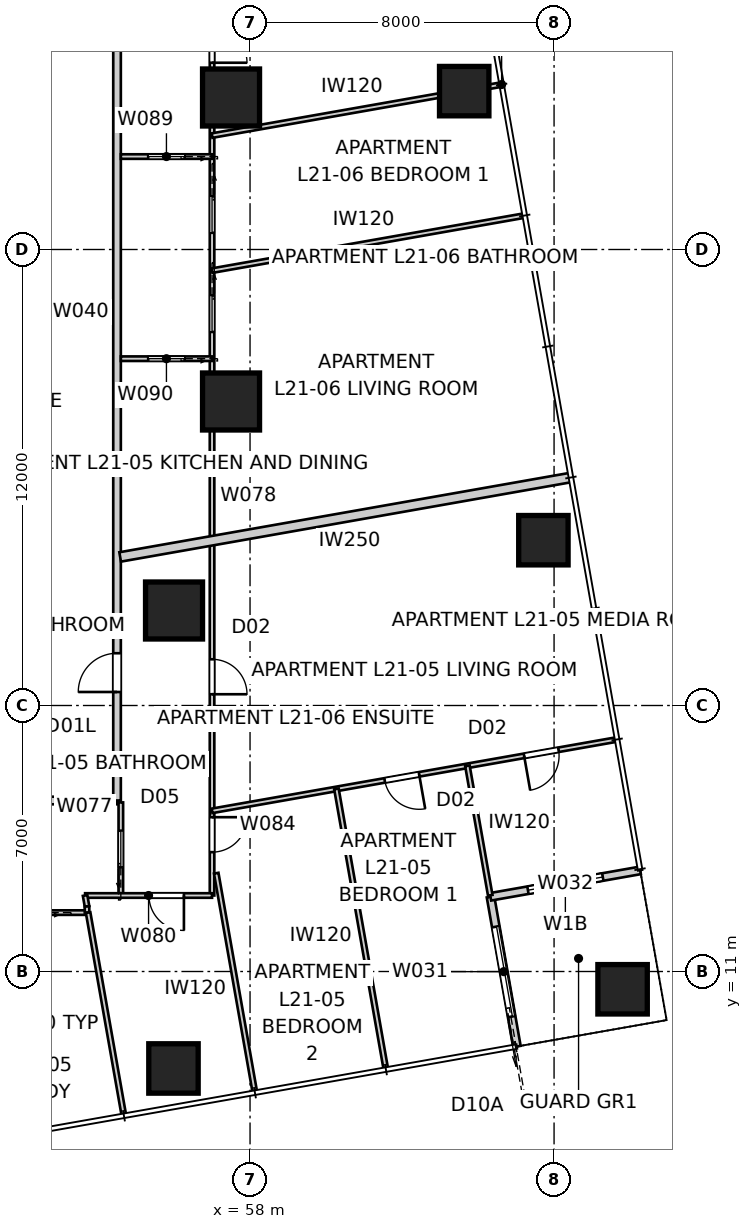
"""IFC4 building model, lengths in metres.
Left out: names, types, materials, properties, quantities, classifications, styles, units other than length and angle.
Written with IfcOpenShell. Run it as: python <this file> out.ifc"""

import sys

from ifc_helpers import new_model, si_unit, direction, frame, frame_2d, origin, origin_2d, place, context, subcontext, project, spatial, rectangle, extrude, element, fill, save


model = new_model("IFC4")
c1 = context("Model", 3, precision=1e-05, world=origin(), true_north=direction((0.0, 1.0)))
c2 = subcontext(c1, "Body", "Model", "MODEL_VIEW")
j1 = project(units=[si_unit("LENGTHUNIT", "METRE"), si_unit("PLANEANGLEUNIT", "RADIAN")], contexts=[c1])
p1 = place(None, origin())
s1 = spatial("IfcSite", under=j1, at=p1, CompositionType="ELEMENT")
p2 = place(p1, origin())
s2 = spatial("IfcBuilding", under=s1, at=p2, CompositionType="ELEMENT")
p3 = place(p2, frame((0.0, 0.0, 79.4)))
s3 = spatial("IfcBuildingStorey", under=s2, at=p3, CompositionType="ELEMENT", Elevation=79.4)
for number, where, z_axis, x_axis in (
    (1, (55.985, 8.448, -0.15), (0.0, 0.0, 1.0), (1.0, 0.0, 0.0)),
    (2, (67.803, 10.532, -0.15), (0.0, 0.0, 1.0), (1.0, 0.0, 0.0)),
    (3, (65.719, 22.35, -0.15), (0.0, 0.0, 1.0), (1.0, 0.0, 0.0)),
    (4, (63.635, 34.167, -0.15), (0.0, 0.0, 1.0), (1.0, 0.0, 0.0)),
):
    element("IfcColumn", number, at=place(p3, frame(where, z_axis=z_axis, x_axis=x_axis)), inside=s3, PredefinedType="COLUMN", context=c2, shape_type="SweptSolid", body=[
        extrude(rectangle(XDim=1.3, YDim=1.3, at=origin_2d()), origin(), (0.0, 0.0, 1.0), 3.55),
    ])
for number, where, z_axis, x_axis in (
    (5, (57.5, 26.0, 0.0), (0.0, 0.0, 1.0), (1.0, 0.0, 0.0)),
    (6, (57.5, 34.0, 0.0), (0.0, 0.0, 1.0), (1.0, 0.0, 0.0)),
    (7, (56.0, 20.5, 0.0), (0.0, 0.0, 1.0), (1.0, 0.0, 0.0)),
):
    element("IfcColumn", number, at=place(p3, frame(where, z_axis=z_axis, x_axis=x_axis)), inside=s3, PredefinedType="COLUMN", context=c2, shape_type="SweptSolid", body=[
        extrude(rectangle(XDim=1.5, YDim=1.5, at=origin_2d()), origin(), (0.0, 0.0, 1.0), 3.4),
    ])
p4 = place(p3, frame((65.022, 9.026, 0.0), z_axis=(0.0, 0.0, 1.0), x_axis=(-0.173646056486, 0.984808127031, 0.0)))
e8 = element("IfcWall", 8, at=p4, inside=s3, PredefinedType="SOLIDWALL", context=c2, shape_type="SweptSolid", body=[
    extrude(rectangle(XDim=4.0, YDim=0.2, at=frame_2d((2.0, 0.0))), origin(), (0.0, 0.0, 1.0), 3.25),
])
p5 = place(p4, frame((0.8, 0.0, 0.0)))
e9 = element("IfcOpeningElement", 9, at=p5, cuts=e8, PredefinedType="OPENING", context=c2, shape_type="SweptSolid", body=[
    extrude(rectangle(XDim=2.4, YDim=2.1, at=frame_2d((1.2, 1.05))), frame((0.0, 0.11, 0.0), z_axis=(0.0, -1.0, 0.0), x_axis=(1.0, 0.0, 0.0)), (0.0, 0.0, 1.0), 0.22),
])
p6 = place(p3, frame((64.328, 12.966, 0.0), z_axis=(0.0, 0.0, 1.0), x_axis=(0.984808127031, 0.173646056486, 0.0)))
e10 = element("IfcWall", 10, at=p6, inside=s3, PredefinedType="SOLIDWALL", context=c2, shape_type="SweptSolid", body=[
    extrude(rectangle(XDim=4.0, YDim=0.2, at=frame_2d((2.0, 0.0))), origin(), (0.0, 0.0, 1.0), 3.25),
])
p7 = place(p6, frame((1.0, 0.0, 0.45)))
e11 = element("IfcOpeningElement", 11, at=p7, cuts=e10, PredefinedType="OPENING", context=c2, shape_type="SweptSolid", body=[
    extrude(rectangle(XDim=2.0, YDim=1.8, at=frame_2d((1.0, 0.9))), frame((0.0, 0.11, 0.0), z_axis=(0.0, -1.0, 0.0), x_axis=(1.0, 0.0, 0.0)), (0.0, 0.0, 1.0), 0.22),
])
p8 = place(p3, frame((25.5, 15.5, 0.0), z_axis=(0.0, 0.0, 1.0), x_axis=(1.0, 0.0, 0.0)))
e12 = element("IfcWall", 12, at=p8, inside=s3, PredefinedType="PARTITIONING", context=c2, shape_type="SweptSolid", body=[
    extrude(rectangle(XDim=29.0, YDim=0.2, at=frame_2d((14.5, 0.0))), origin(), (0.0, 0.0, 1.0), 3.25),
])
p9 = place(p8, frame((15.794, 0.0, 0.0)))
e13 = element("IfcOpeningElement", 13, at=p9, cuts=e12, PredefinedType="OPENING", context=c2, shape_type="SweptSolid", body=[
    extrude(rectangle(XDim=1.02, YDim=2.34, at=frame_2d((0.51, 1.17))), frame((0.0, 0.11, 0.0), z_axis=(0.0, -1.0, 0.0), x_axis=(1.0, 0.0, 0.0)), (0.0, 0.0, 1.0), 0.22),
])
p10 = place(p8, frame((6.067, 0.0, 0.0)))
e14 = element("IfcOpeningElement", 14, at=p10, cuts=e12, PredefinedType="OPENING", context=c2, shape_type="SweptSolid", body=[
    extrude(rectangle(XDim=1.02, YDim=2.34, at=frame_2d((0.51, 1.17))), frame((0.0, 0.11, 0.0), z_axis=(0.0, -1.0, 0.0), x_axis=(1.0, 0.0, 0.0)), (0.0, 0.0, 1.0), 0.22),
])
p11 = place(p8, frame((1.079, 0.0, 0.0)))
e15 = element("IfcOpeningElement", 15, at=p11, cuts=e12, PredefinedType="OPENING", context=c2, shape_type="SweptSolid", body=[
    extrude(rectangle(XDim=1.02, YDim=2.34, at=frame_2d((0.51, 1.17))), frame((0.0, 0.11, 0.0), z_axis=(0.0, -1.0, 0.0), x_axis=(1.0, 0.0, 0.0)), (0.0, 0.0, 1.0), 0.22),
])
p12 = place(p3, frame((54.5, 15.5, 0.0), z_axis=(0.0, 0.0, 1.0), x_axis=(0.0, 1.0, 0.0)))
e16 = element("IfcWall", 16, at=p12, inside=s3, PredefinedType="PARTITIONING", context=c2, shape_type="SweptSolid", body=[
    extrude(rectangle(XDim=29.0, YDim=0.2, at=frame_2d((14.5, 0.0))), origin(), (0.0, 0.0, 1.0), 3.25),
])
p13 = place(p12, frame((21.815, 0.0, 0.0)))
e17 = element("IfcOpeningElement", 17, at=p13, cuts=e16, PredefinedType="OPENING", context=c2, shape_type="SweptSolid", body=[
    extrude(rectangle(XDim=1.02, YDim=2.34, at=frame_2d((0.51, 1.17))), frame((0.0, 0.11, 0.0), z_axis=(0.0, -1.0, 0.0), x_axis=(1.0, 0.0, 0.0)), (0.0, 0.0, 1.0), 0.22),
])
p14 = place(p12, frame((2.855, 0.0, 0.0)))
e18 = element("IfcOpeningElement", 18, at=p14, cuts=e16, PredefinedType="OPENING", context=c2, shape_type="SweptSolid", body=[
    extrude(rectangle(XDim=1.02, YDim=2.1, at=frame_2d((0.51, 1.05))), frame((0.0, 0.11, 0.0), z_axis=(0.0, -1.0, 0.0), x_axis=(1.0, 0.0, 0.0)), (0.0, 0.0, 1.0), 0.22),
])
p15 = place(p3, frame((66.444, 24.001, 0.0), z_axis=(0.0, 0.0, 1.0), x_axis=(-0.984806609184, -0.173654664517, 0.0)))
e19 = element("IfcWall", 19, at=p15, inside=s3, PredefinedType="PARTITIONING", context=c2, shape_type="SweptSolid", body=[
    extrude(rectangle(XDim=12.044, YDim=0.25, at=frame_2d((6.022, 0.0))), origin(), (0.0, 0.0, 1.0), 3.25),
])
p16 = place(p3, frame((54.6, 13.0, 0.0), z_axis=(0.0, 0.0, 1.0), x_axis=(0.0, 1.0, 0.0)))
e20 = element("IfcWall", 20, at=p16, inside=s3, PredefinedType="PARTITIONING", context=c2, shape_type="SweptSolid", body=[
    extrude(rectangle(XDim=2.45, YDim=0.12, at=frame_2d((1.225, 0.0))), origin(), (0.0, 0.0, 1.0), 3.25),
])
p17 = place(p16, frame((0.745, 0.0, 0.0)))
e21 = element("IfcOpeningElement", 21, at=p17, cuts=e20, PredefinedType="OPENING", context=c2, shape_type="SweptSolid", body=[
    extrude(rectangle(XDim=0.96, YDim=2.1, at=frame_2d((0.48, 1.05))), frame((0.0, 0.07, 0.0), z_axis=(0.0, -1.0, 0.0), x_axis=(1.0, 0.0, 0.0)), (0.0, 0.0, 1.0), 0.14),
])
p18 = place(p3, frame((57.0, 47.0, 0.0), z_axis=(0.0, 0.0, 1.0), x_axis=(0.0, -1.0, 0.0)))
e22 = element("IfcWall", 22, at=p18, inside=s3, PredefinedType="PARTITIONING", context=c2, shape_type="SweptSolid", body=[
    extrude(rectangle(XDim=34.0, YDim=0.12, at=frame_2d((17.0, 0.0))), origin(), (0.0, 0.0, 1.0), 2.55),
])
p19 = place(p18, frame((8.361, 0.0, 0.0)))
e23 = element("IfcOpeningElement", 23, at=p19, cuts=e22, PredefinedType="OPENING", context=c2, shape_type="SweptSolid", body=[
    extrude(rectangle(XDim=0.92, YDim=2.34, at=frame_2d((0.46, 1.17))), frame((0.0, 0.07, 0.0), z_axis=(0.0, -1.0, 0.0), x_axis=(1.0, 0.0, 0.0)), (0.0, 0.0, 1.0), 0.14),
])
p20 = place(p18, frame((11.166, 0.0, 0.0)))
e24 = element("IfcOpeningElement", 24, at=p20, cuts=e22, PredefinedType="OPENING", context=c2, shape_type="SweptSolid", body=[
    extrude(rectangle(XDim=0.92, YDim=2.34, at=frame_2d((0.46, 1.17))), frame((0.0, 0.07, 0.0), z_axis=(0.0, -1.0, 0.0), x_axis=(1.0, 0.0, 0.0)), (0.0, 0.0, 1.0), 0.14),
])
p21 = place(p18, frame((4.683, 0.0, 0.0)))
e25 = element("IfcOpeningElement", 25, at=p21, cuts=e22, PredefinedType="OPENING", context=c2, shape_type="SweptSolid", body=[
    extrude(rectangle(XDim=0.92, YDim=2.34, at=frame_2d((0.46, 1.17))), frame((0.0, 0.07, 0.0), z_axis=(0.0, -1.0, 0.0), x_axis=(1.0, 0.0, 0.0)), (0.0, 0.0, 1.0), 0.14),
])
p22 = place(p18, frame((27.784, 0.0, 0.0)))
e26 = element("IfcOpeningElement", 26, at=p22, cuts=e22, PredefinedType="OPENING", context=c2, shape_type="SweptSolid", body=[
    extrude(rectangle(XDim=0.92, YDim=2.34, at=frame_2d((0.46, 1.17))), frame((0.0, 0.07, 0.0), z_axis=(0.0, -1.0, 0.0), x_axis=(1.0, 0.0, 0.0)), (0.0, 0.0, 1.0), 0.14),
])
p23 = place(p18, frame((31.939, 0.0, 0.0)))
e27 = element("IfcOpeningElement", 27, at=p23, cuts=e22, PredefinedType="OPENING", context=c2, shape_type="SweptSolid", body=[
    extrude(rectangle(XDim=0.92, YDim=2.34, at=frame_2d((0.46, 1.17))), frame((0.0, 0.07, 0.0), z_axis=(0.0, -1.0, 0.0), x_axis=(1.0, 0.0, 0.0)), (0.0, 0.0, 1.0), 0.14),
])
p24 = place(p18, frame((15.601, 0.0, 0.0)))
e28 = element("IfcOpeningElement", 28, at=p24, cuts=e22, PredefinedType="OPENING", context=c2, shape_type="SweptSolid", body=[
    extrude(rectangle(XDim=0.96, YDim=2.1, at=frame_2d((0.48, 1.05))), frame((0.0, 0.07, 0.0), z_axis=(0.0, -1.0, 0.0), x_axis=(1.0, 0.0, 0.0)), (0.0, 0.0, 1.0), 0.14),
])
p25 = place(p18, frame((18.21, 0.0, 0.0)))
e29 = element("IfcOpeningElement", 29, at=p25, cuts=e22, PredefinedType="OPENING", context=c2, shape_type="SweptSolid", body=[
    extrude(rectangle(XDim=0.96, YDim=2.1, at=frame_2d((0.48, 1.05))), frame((0.0, 0.07, 0.0), z_axis=(0.0, -1.0, 0.0), x_axis=(1.0, 0.0, 0.0)), (0.0, 0.0, 1.0), 0.14),
])
p26 = place(p18, frame((1.19, 0.0, 0.0)))
e30 = element("IfcOpeningElement", 30, at=p26, cuts=e22, PredefinedType="OPENING", context=c2, shape_type="SweptSolid", body=[
    extrude(rectangle(XDim=0.96, YDim=2.1, at=frame_2d((0.48, 1.05))), frame((0.0, 0.07, 0.0), z_axis=(0.0, -1.0, 0.0), x_axis=(1.0, 0.0, 0.0)), (0.0, 0.0, 1.0), 0.14),
])
p27 = place(p3, frame((57.0, 13.0, 0.0), z_axis=(0.0, 0.0, 1.0), x_axis=(-1.0, 0.0, 0.0)))
e31 = element("IfcWall", 31, at=p27, inside=s3, PredefinedType="PARTITIONING", context=c2, shape_type="SweptSolid", body=[
    extrude(rectangle(XDim=3.34, YDim=0.12, at=frame_2d((1.67, 0.0))), origin(), (0.0, 0.0, 1.0), 3.25),
])
p28 = place(p27, frame((0.74, 0.0, 0.0)))
e32 = element("IfcOpeningElement", 32, at=p28, cuts=e31, PredefinedType="OPENING", context=c2, shape_type="SweptSolid", body=[
    extrude(rectangle(XDim=0.92, YDim=2.34, at=frame_2d((0.46, 1.17))), frame((0.0, 0.07, 0.0), z_axis=(0.0, -1.0, 0.0), x_axis=(1.0, 0.0, 0.0)), (0.0, 0.0, 1.0), 0.14),
])
p29 = place(p3, frame((53.71, 12.55, 0.0), z_axis=(0.0, 0.0, 1.0), x_axis=(-1.0, 0.0, 0.0)))
e33 = element("IfcWall", 33, at=p29, inside=s3, PredefinedType="PARTITIONING", context=c2, shape_type="SweptSolid", body=[
    extrude(rectangle(XDim=3.525, YDim=0.12, at=frame_2d((1.763, 0.0))), origin(), (0.0, 0.0, 1.0), 3.25),
])
p30 = place(p29, frame((1.283, 0.0, 0.0)))
e34 = element("IfcOpeningElement", 34, at=p30, cuts=e33, PredefinedType="OPENING", context=c2, shape_type="SweptSolid", body=[
    extrude(rectangle(XDim=0.96, YDim=2.1, at=frame_2d((0.48, 1.05))), frame((0.0, 0.07, 0.0), z_axis=(0.0, -1.0, 0.0), x_axis=(1.0, 0.0, 0.0)), (0.0, 0.0, 1.0), 0.14),
])
p31 = place(p3, frame((53.66, 13.0, 0.0), z_axis=(0.0, 0.0, 1.0), x_axis=(0.172927442902, -0.984934566096, 0.0)))
e35 = element("IfcWall", 35, at=p31, inside=s3, PredefinedType="PARTITIONING", context=c2, shape_type="SweptSolid", body=[
    extrude(rectangle(XDim=0.292, YDim=0.12, at=frame_2d((0.146, 0.0))), origin(), (0.0, 0.0, 1.0), 3.25),
])
p32 = place(p3, frame((67.62, 17.1, 0.0), z_axis=(0.0, 0.0, 1.0), x_axis=(-0.984807253583, -0.173651010046, 0.0)))
e36 = element("IfcWall", 36, at=p32, inside=s3, PredefinedType="PARTITIONING", context=c2, shape_type="SweptSolid", body=[
    extrude(rectangle(XDim=10.783, YDim=0.12, at=frame_2d((5.392, 0.0))), origin(), (0.0, 0.0, 1.0), 3.25),
])
p33 = place(p32, frame((1.525, 0.0, 0.0)))
e37 = element("IfcOpeningElement", 37, at=p33, cuts=e36, PredefinedType="OPENING", context=c2, shape_type="SweptSolid", body=[
    extrude(rectangle(XDim=0.92, YDim=2.34, at=frame_2d((0.46, 1.17))), frame((0.0, 0.07, 0.0), z_axis=(0.0, -1.0, 0.0), x_axis=(1.0, 0.0, 0.0)), (0.0, 0.0, 1.0), 0.14),
])
p34 = place(p32, frame((5.25, 0.0, 0.0)))
e38 = element("IfcOpeningElement", 38, at=p34, cuts=e36, PredefinedType="OPENING", context=c2, shape_type="SweptSolid", body=[
    extrude(rectangle(XDim=0.92, YDim=2.34, at=frame_2d((0.46, 1.17))), frame((0.0, 0.07, 0.0), z_axis=(0.0, -1.0, 0.0), x_axis=(1.0, 0.0, 0.0)), (0.0, 0.0, 1.0), 0.14),
])
p35 = place(p3, frame((61.568, 8.458, 0.0), z_axis=(0.0, 0.0, 1.0), x_axis=(-0.173647177755, 0.984807929323, 0.0)))
e39 = element("IfcWall", 39, at=p35, inside=s3, PredefinedType="PARTITIONING", context=c2, shape_type="SweptSolid", body=[
    extrude(rectangle(XDim=7.46, YDim=0.12, at=frame_2d((3.73, 0.0))), origin(), (0.0, 0.0, 1.0), 3.25),
])
p36 = place(p3, frame((63.72, 16.412, 0.0), z_axis=(0.0, 0.0, 1.0), x_axis=(0.173660541335, -0.984805572884, 0.0)))
e40 = element("IfcWall", 40, at=p36, inside=s3, PredefinedType="PARTITIONING", context=c2, shape_type="SweptSolid", body=[
    extrude(rectangle(XDim=3.46, YDim=0.12, at=frame_2d((1.73, 0.0))), origin(), (0.0, 0.0, 1.0), 3.25),
])
p37 = place(p3, frame((58.122, 7.85, 0.0), z_axis=(0.0, 0.0, 1.0), x_axis=(-0.173634707655, 0.984810128044, 0.0)))
e41 = element("IfcWall", 41, at=p37, inside=s3, PredefinedType="PARTITIONING", context=c2, shape_type="SweptSolid", body=[
    extrude(rectangle(XDim=5.825, YDim=0.12, at=frame_2d((2.913, 0.0))), origin(), (0.0, 0.0, 1.0), 2.638),
])
p38 = place(p3, frame((53.739, 12.55, 0.0), z_axis=(0.0, 0.0, 1.0), x_axis=(0.173632864151, -0.984810453076, 0.0)))
e42 = element("IfcWall", 42, at=p38, inside=s3, PredefinedType="PARTITIONING", context=c2, shape_type="SweptSolid", body=[
    extrude(rectangle(XDim=5.389, YDim=0.12, at=frame_2d((2.695, 0.0))), origin(), (0.0, 0.0, 1.0), 3.25),
])
p39 = place(p3, frame((57.0, 32.446, 0.0), z_axis=(0.0, 0.0, 1.0), x_axis=(-1.0, 0.0, 0.0)))
e43 = element("IfcWall", 43, at=p39, inside=s3, PredefinedType="PARTITIONING", context=c2, shape_type="SweptSolid", body=[
    extrude(rectangle(XDim=2.4, YDim=0.12, at=frame_2d((1.2, 0.0))), origin(), (0.0, 0.0, 1.0), 3.25),
])
p40 = place(p39, frame((0.72, 0.0, 0.0)))
e44 = element("IfcOpeningElement", 44, at=p40, cuts=e43, PredefinedType="OPENING", context=c2, shape_type="SweptSolid", body=[
    extrude(rectangle(XDim=0.96, YDim=2.1, at=frame_2d((0.48, 1.05))), frame((0.0, 0.07, 0.0), z_axis=(0.0, -1.0, 0.0), x_axis=(1.0, 0.0, 0.0)), (0.0, 0.0, 1.0), 0.14),
])
p41 = place(p3, frame((57.0, 27.126, 0.0), z_axis=(0.0, 0.0, 1.0), x_axis=(-1.0, 0.0, 0.0)))
e45 = element("IfcWall", 45, at=p41, inside=s3, PredefinedType="PARTITIONING", context=c2, shape_type="SweptSolid", body=[
    extrude(rectangle(XDim=2.4, YDim=0.12, at=frame_2d((1.2, 0.0))), origin(), (0.0, 0.0, 1.0), 2.796),
])
p42 = place(p41, frame((0.72, 0.0, 0.0)))
e46 = element("IfcOpeningElement", 46, at=p42, cuts=e45, PredefinedType="OPENING", context=c2, shape_type="SweptSolid", body=[
    extrude(rectangle(XDim=0.96, YDim=2.1, at=frame_2d((0.48, 1.05))), frame((0.0, 0.07, 0.0), z_axis=(0.0, -1.0, 0.0), x_axis=(1.0, 0.0, 0.0)), (0.0, 0.0, 1.0), 0.14),
])
p43 = place(p3, frame((57.0, 29.444, 0.0), z_axis=(0.0, 0.0, 1.0), x_axis=(0.984807787824, 0.173647980238, 0.0)))
e47 = element("IfcWall", 47, at=p43, inside=s3, PredefinedType="PARTITIONING", context=c2, shape_type="SweptSolid", body=[
    extrude(rectangle(XDim=8.315, YDim=0.12, at=frame_2d((4.157, 0.0))), origin(), (0.0, 0.0, 1.0), 3.25),
])
p44 = place(p3, frame((57.0, 32.998, 0.0), z_axis=(0.0, 0.0, 1.0), x_axis=(0.984808453088, 0.173644207293, 0.0)))
e48 = element("IfcWall", 48, at=p44, inside=s3, PredefinedType="PARTITIONING", context=c2, shape_type="SweptSolid", body=[
    extrude(rectangle(XDim=7.698, YDim=0.12, at=frame_2d((3.849, 0.0))), origin(), (0.0, 0.0, 1.0), 3.25),
])
p45 = place(p3, frame((53.71, 12.712, 0.0), z_axis=(0.0, 0.0, 1.0), x_axis=(0.0, -1.0, 0.0)))
e49 = element("IfcWall", 49, at=p45, inside=s3, PredefinedType="PARTITIONING", context=c2, shape_type="SweptSolid", body=[
    extrude(rectangle(XDim=0.162, YDim=0.12, at=frame_2d((0.081, 0.0))), origin(), (0.0, 0.0, 1.0), 3.25),
])
p46 = place(p5, origin())
e50 = element("IfcDoor", 50, at=p46, inside=s3, OperationType="SLIDING_TO_LEFT", PredefinedType="DOOR", context=c2, shape_type="SweptSolid", body=[
    extrude(rectangle(XDim=2.4, YDim=2.1, at=frame_2d((1.2, 1.05))), frame((0.0, 0.025, 0.0), z_axis=(0.0, -1.0, 0.0), x_axis=(1.0, 0.0, 0.0)), (0.0, 0.0, 1.0), 0.05),
])
fill(e9, e50)
p47 = place(p7, origin())
e51 = element("IfcWindow", 51, at=p47, inside=s3, PartitioningType="SINGLE_PANEL", PredefinedType="WINDOW", context=c2, shape_type="SweptSolid", body=[
    extrude(rectangle(XDim=2.0, YDim=1.8, at=frame_2d((1.0, 0.9))), frame((0.0, 0.03, 0.0), z_axis=(0.0, -1.0, 0.0), x_axis=(1.0, 0.0, 0.0)), (0.0, 0.0, 1.0), 0.06),
])
fill(e11, e51)
p48 = place(p14, origin())
e52 = element("IfcDoor", 52, at=p48, inside=s3, OperationType="SINGLE_SWING_LEFT", PredefinedType="DOOR", context=c2, shape_type="SweptSolid", body=[
    extrude(rectangle(XDim=1.02, YDim=2.1, at=frame_2d((0.51, 1.05))), frame((0.0, 0.025, 0.0), z_axis=(0.0, -1.0, 0.0), x_axis=(1.0, 0.0, 0.0)), (0.0, 0.0, 1.0), 0.05),
])
fill(e18, e52)
p49 = place(p20, origin())
e53 = element("IfcDoor", 53, at=p49, inside=s3, OperationType="SINGLE_SWING_RIGHT", PredefinedType="DOOR", context=c2, shape_type="SweptSolid", body=[
    extrude(rectangle(XDim=0.92, YDim=2.34, at=frame_2d((0.46, 1.17))), frame((0.0, 0.025, 0.0), z_axis=(0.0, -1.0, 0.0), x_axis=(1.0, 0.0, 0.0)), (0.0, 0.0, 1.0), 0.05),
])
fill(e24, e53)
p50 = place(p40, origin())
e54 = element("IfcDoor", 54, at=p50, inside=s3, OperationType="SLIDING_TO_LEFT", PredefinedType="DOOR", context=c2, shape_type="SweptSolid", body=[
    extrude(rectangle(XDim=0.96, YDim=2.1, at=frame_2d((0.48, 1.05))), frame((0.0, 0.025, 0.0), z_axis=(0.0, -1.0, 0.0), x_axis=(1.0, 0.0, 0.0)), (0.0, 0.0, 1.0), 0.05),
])
fill(e44, e54)
p51 = place(p22, origin())
e55 = element("IfcDoor", 55, at=p51, inside=s3, OperationType="SINGLE_SWING_RIGHT", PredefinedType="DOOR", context=c2, shape_type="SweptSolid", body=[
    extrude(rectangle(XDim=0.92, YDim=2.34, at=frame_2d((0.46, 1.17))), frame((0.0, 0.025, 0.0), z_axis=(0.0, -1.0, 0.0), x_axis=(1.0, 0.0, 0.0)), (0.0, 0.0, 1.0), 0.05),
])
fill(e26, e55)
p52 = place(p17, origin())
e56 = element("IfcDoor", 56, at=p52, inside=s3, OperationType="SLIDING_TO_LEFT", PredefinedType="DOOR", context=c2, shape_type="SweptSolid", body=[
    extrude(rectangle(XDim=0.96, YDim=2.1, at=frame_2d((0.48, 1.05))), frame((0.0, 0.025, 0.0), z_axis=(0.0, -1.0, 0.0), x_axis=(1.0, 0.0, 0.0)), (0.0, 0.0, 1.0), 0.05),
])
fill(e21, e56)
p53 = place(p28, origin())
e57 = element("IfcDoor", 57, at=p53, inside=s3, OperationType="SINGLE_SWING_LEFT", PredefinedType="DOOR", context=c2, shape_type="SweptSolid", body=[
    extrude(rectangle(XDim=0.92, YDim=2.34, at=frame_2d((0.46, 1.17))), frame((0.0, 0.025, 0.0), z_axis=(0.0, -1.0, 0.0), x_axis=(1.0, 0.0, 0.0)), (0.0, 0.0, 1.0), 0.05),
])
fill(e32, e57)
p54 = place(p23, origin())
e58 = element("IfcDoor", 58, at=p54, inside=s3, OperationType="SINGLE_SWING_LEFT", PredefinedType="DOOR", context=c2, shape_type="SweptSolid", body=[
    extrude(rectangle(XDim=0.92, YDim=2.34, at=frame_2d((0.46, 1.17))), frame((0.0, 0.025, 0.0), z_axis=(0.0, -1.0, 0.0), x_axis=(1.0, 0.0, 0.0)), (0.0, 0.0, 1.0), 0.05),
])
fill(e27, e58)
p55 = place(p24, origin())
e59 = element("IfcDoor", 59, at=p55, inside=s3, OperationType="SLIDING_TO_LEFT", PredefinedType="DOOR", context=c2, shape_type="SweptSolid", body=[
    extrude(rectangle(XDim=0.96, YDim=2.1, at=frame_2d((0.48, 1.05))), frame((0.0, 0.025, 0.0), z_axis=(0.0, -1.0, 0.0), x_axis=(1.0, 0.0, 0.0)), (0.0, 0.0, 1.0), 0.05),
])
fill(e28, e59)
p56 = place(p42, origin())
e60 = element("IfcDoor", 60, at=p56, inside=s3, OperationType="SLIDING_TO_LEFT", PredefinedType="DOOR", context=c2, shape_type="SweptSolid", body=[
    extrude(rectangle(XDim=0.96, YDim=2.1, at=frame_2d((0.48, 1.05))), frame((0.0, 0.025, 0.0), z_axis=(0.0, -1.0, 0.0), x_axis=(1.0, 0.0, 0.0)), (0.0, 0.0, 1.0), 0.05),
])
fill(e46, e60)
p57 = place(p25, origin())
e61 = element("IfcDoor", 61, at=p57, inside=s3, OperationType="SLIDING_TO_LEFT", PredefinedType="DOOR", context=c2, shape_type="SweptSolid", body=[
    extrude(rectangle(XDim=0.96, YDim=2.1, at=frame_2d((0.48, 1.05))), frame((0.0, 0.025, 0.0), z_axis=(0.0, -1.0, 0.0), x_axis=(1.0, 0.0, 0.0)), (0.0, 0.0, 1.0), 0.05),
])
fill(e29, e61)
p58 = place(p33, origin())
e62 = element("IfcDoor", 62, at=p58, inside=s3, OperationType="SINGLE_SWING_RIGHT", PredefinedType="DOOR", context=c2, shape_type="SweptSolid", body=[
    extrude(rectangle(XDim=0.92, YDim=2.34, at=frame_2d((0.46, 1.17))), frame((0.0, 0.025, 0.0), z_axis=(0.0, -1.0, 0.0), x_axis=(1.0, 0.0, 0.0)), (0.0, 0.0, 1.0), 0.05),
])
fill(e37, e62)
p59 = place(p34, origin())
e63 = element("IfcDoor", 63, at=p59, inside=s3, OperationType="SINGLE_SWING_LEFT", PredefinedType="DOOR", context=c2, shape_type="SweptSolid", body=[
    extrude(rectangle(XDim=0.92, YDim=2.34, at=frame_2d((0.46, 1.17))), frame((0.0, 0.025, 0.0), z_axis=(0.0, -1.0, 0.0), x_axis=(1.0, 0.0, 0.0)), (0.0, 0.0, 1.0), 0.05),
])
fill(e38, e63)
save(model, sys.argv[1])
